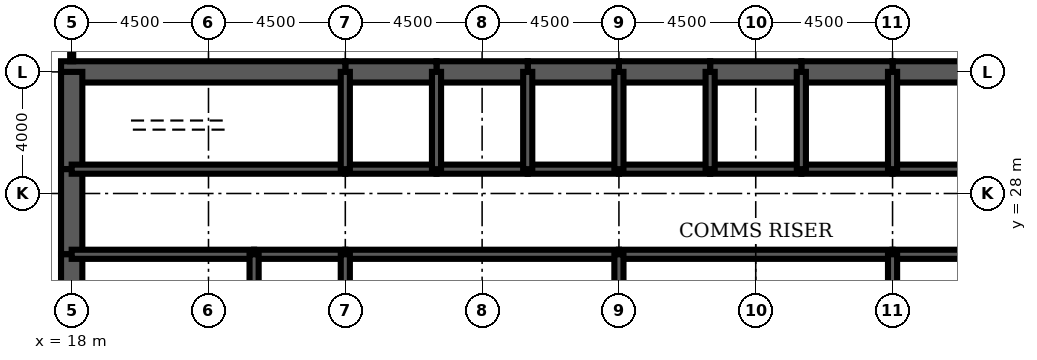
"""IFC4 building model, lengths in metres.
Left out: names, types, materials, properties, quantities, classifications, styles, units other than length and angle.
Written with IfcOpenShell. Run it as: python <this file> out.ifc"""

import sys

from ifc_helpers import new_model, si_unit, direction, frame, frame_2d, origin, place, context, subcontext, project, spatial, rectangle, extrude, element, fill, save


model = new_model("IFC4")
c1 = context("Model", 3, precision=1e-05, world=origin(), true_north=direction((0.0, 1.0)))
c2 = subcontext(c1, "Body", "Model", "MODEL_VIEW")
j1 = project(units=[si_unit("LENGTHUNIT", "METRE"), si_unit("PLANEANGLEUNIT", "RADIAN")], contexts=[c1])
p1 = place(None, origin())
s1 = spatial("IfcSite", under=j1, at=p1, CompositionType="ELEMENT")
p2 = place(p1, origin())
s2 = spatial("IfcBuilding", under=s1, at=p2, CompositionType="ELEMENT")
p3 = place(p2, frame((0.0, 0.0, 287.9)))
s3 = spatial("IfcBuildingStorey", under=s2, at=p3, CompositionType="ELEMENT", Elevation=287.9)
p4 = place(p3, frame((54.35, 32.0, 0.0), z_axis=(0.0, 0.0, 1.0), x_axis=(-1.0, 0.0, 0.0)))
e1 = element("IfcWall", 1, at=p4, inside=s3, PredefinedType="SHEAR", context=c2, shape_type="SweptSolid", body=[
    extrude(rectangle(XDim=9.35, YDim=0.7, at=frame_2d((4.675, 0.0))), origin(), (0.0, 0.0, 1.0), 4.2),
])
for number, where, z_axis, x_axis in (
    (2, (45.0, 32.0, 0.0), (0.0, 0.0, 1.0), (-1.0, 0.0, 0.0)),
    (3, (42.0, 32.0, 0.0), (0.0, 0.0, 1.0), (-1.0, 0.0, 0.0)),
    (4, (39.0, 32.0, 0.0), (0.0, 0.0, 1.0), (-1.0, 0.0, 0.0)),
    (5, (36.0, 32.0, 0.0), (0.0, 0.0, 1.0), (-1.0, 0.0, 0.0)),
    (6, (33.0, 32.0, 0.0), (0.0, 0.0, 1.0), (-1.0, 0.0, 0.0)),
    (7, (30.0, 32.0, 0.0), (0.0, 0.0, 1.0), (-1.0, 0.0, 0.0)),
):
    element("IfcWall", number, at=place(p3, frame(where, z_axis=z_axis, x_axis=x_axis)), inside=s3, PredefinedType="SHEAR", context=c2, shape_type="SweptSolid", body=[
        extrude(rectangle(XDim=3.0, YDim=0.7, at=frame_2d((1.5, 0.0))), origin(), (0.0, 0.0, 1.0), 4.2),
    ])
p5 = place(p3, frame((27.0, 32.0, 0.0), z_axis=(0.0, 0.0, 1.0), x_axis=(-1.0, 0.0, 0.0)))
e8 = element("IfcWall", 8, at=p5, inside=s3, PredefinedType="SHEAR", context=c2, shape_type="SweptSolid", body=[
    extrude(rectangle(XDim=9.35, YDim=0.7, at=frame_2d((4.675, 0.0))), origin(), (0.0, 0.0, 1.0), 4.2),
])
p6 = place(p3, frame((18.0, 32.0, 0.0), z_axis=(0.0, 0.0, 1.0), x_axis=(0.0, -1.0, 0.0)))
e9 = element("IfcWall", 9, at=p6, inside=s3, PredefinedType="SHEAR", context=c2, shape_type="SweptSolid", body=[
    extrude(rectangle(XDim=3.2, YDim=0.7, at=frame_2d((1.6, 0.0))), origin(), (0.0, 0.0, 1.0), 4.2),
])
p7 = place(p3, frame((18.0, 28.8, 0.0), z_axis=(0.0, 0.0, 1.0), x_axis=(0.0, -1.0, 0.0)))
e10 = element("IfcWall", 10, at=p7, inside=s3, PredefinedType="SHEAR", context=c2, shape_type="SweptSolid", body=[
    extrude(rectangle(XDim=2.8, YDim=0.7, at=frame_2d((1.4, 0.0))), origin(), (0.0, 0.0, 1.0), 4.2),
])
p8 = place(p7, frame((0.4, 0.0, 0.0)))
e11 = element("IfcOpeningElement", 11, at=p8, cuts=e10, PredefinedType="OPENING", context=c2, shape_type="SweptSolid", body=[
    extrude(rectangle(XDim=1.8, YDim=2.1, at=frame_2d((0.9, 1.05))), frame((0.0, 0.36, 0.0), z_axis=(0.0, -1.0, 0.0), x_axis=(1.0, 0.0, 0.0)), (0.0, 0.0, 1.0), 0.72),
])
p9 = place(p3, frame((18.0, 26.0, 0.0), z_axis=(0.0, 0.0, 1.0), x_axis=(0.0, -1.0, 0.0)))
e12 = element("IfcWall", 12, at=p9, inside=s3, PredefinedType="SHEAR", context=c2, shape_type="SweptSolid", body=[
    extrude(rectangle(XDim=4.0, YDim=0.7, at=frame_2d((2.0, 0.0))), origin(), (0.0, 0.0, 1.0), 4.2),
])
p10 = place(p3, frame((18.0, 28.8, 0.0), z_axis=(0.0, 0.0, 1.0), x_axis=(1.0, 0.0, 0.0)))
e13 = element("IfcWall", 13, at=p10, inside=s3, PredefinedType="SOLIDWALL", context=c2, shape_type="SweptSolid", body=[
    extrude(rectangle(XDim=9.0, YDim=0.3, at=frame_2d((4.5, 0.0))), origin(), (0.0, 0.0, 1.0), 4.2),
])
p11 = place(p10, frame((0.65, 0.0, 0.0)))
e14 = element("IfcOpeningElement", 14, at=p11, cuts=e13, PredefinedType="OPENING", context=c2, shape_type="SweptSolid", body=[
    extrude(rectangle(XDim=1.0, YDim=2.1, at=frame_2d((0.5, 1.05))), frame((0.0, 0.16, 0.0), z_axis=(0.0, -1.0, 0.0), x_axis=(1.0, 0.0, 0.0)), (0.0, 0.0, 1.0), 0.32),
])
p12 = place(p3, frame((27.0, 28.8, 0.0), z_axis=(0.0, 0.0, 1.0), x_axis=(1.0, 0.0, 0.0)))
e15 = element("IfcWall", 15, at=p12, inside=s3, PredefinedType="SOLIDWALL", context=c2, shape_type="SweptSolid", body=[
    extrude(rectangle(XDim=3.0, YDim=0.3, at=frame_2d((1.5, 0.0))), origin(), (0.0, 0.0, 1.0), 4.2),
])
p13 = place(p12, frame((0.95, 0.0, 0.0)))
e16 = element("IfcOpeningElement", 16, at=p13, cuts=e15, PredefinedType="OPENING", context=c2, shape_type="SweptSolid", body=[
    extrude(rectangle(XDim=1.1, YDim=2.2, at=frame_2d((0.55, 1.1))), frame((0.0, 0.16, 0.0), z_axis=(0.0, -1.0, 0.0), x_axis=(1.0, 0.0, 0.0)), (0.0, 0.0, 1.0), 0.32),
])
p14 = place(p3, frame((30.0, 28.8, 0.0), z_axis=(0.0, 0.0, 1.0), x_axis=(1.0, 0.0, 0.0)))
e17 = element("IfcWall", 17, at=p14, inside=s3, PredefinedType="SOLIDWALL", context=c2, shape_type="SweptSolid", body=[
    extrude(rectangle(XDim=3.0, YDim=0.3, at=frame_2d((1.5, 0.0))), origin(), (0.0, 0.0, 1.0), 4.2),
])
p15 = place(p14, frame((0.95, 0.0, 0.0)))
e18 = element("IfcOpeningElement", 18, at=p15, cuts=e17, PredefinedType="OPENING", context=c2, shape_type="SweptSolid", body=[
    extrude(rectangle(XDim=1.1, YDim=2.2, at=frame_2d((0.55, 1.1))), frame((0.0, 0.16, 0.0), z_axis=(0.0, -1.0, 0.0), x_axis=(1.0, 0.0, 0.0)), (0.0, 0.0, 1.0), 0.32),
])
p16 = place(p3, frame((33.0, 28.8, 0.0), z_axis=(0.0, 0.0, 1.0), x_axis=(1.0, 0.0, 0.0)))
e19 = element("IfcWall", 19, at=p16, inside=s3, PredefinedType="SOLIDWALL", context=c2, shape_type="SweptSolid", body=[
    extrude(rectangle(XDim=3.0, YDim=0.3, at=frame_2d((1.5, 0.0))), origin(), (0.0, 0.0, 1.0), 4.2),
])
p17 = place(p16, frame((0.95, 0.0, 0.0)))
e20 = element("IfcOpeningElement", 20, at=p17, cuts=e19, PredefinedType="OPENING", context=c2, shape_type="SweptSolid", body=[
    extrude(rectangle(XDim=1.1, YDim=2.2, at=frame_2d((0.55, 1.1))), frame((0.0, 0.16, 0.0), z_axis=(0.0, -1.0, 0.0), x_axis=(1.0, 0.0, 0.0)), (0.0, 0.0, 1.0), 0.32),
])
p18 = place(p3, frame((36.0, 28.8, 0.0), z_axis=(0.0, 0.0, 1.0), x_axis=(1.0, 0.0, 0.0)))
e21 = element("IfcWall", 21, at=p18, inside=s3, PredefinedType="SOLIDWALL", context=c2, shape_type="SweptSolid", body=[
    extrude(rectangle(XDim=3.0, YDim=0.3, at=frame_2d((1.5, 0.0))), origin(), (0.0, 0.0, 1.0), 4.2),
])
p19 = place(p18, frame((1.0, 0.0, 0.0)))
e22 = element("IfcOpeningElement", 22, at=p19, cuts=e21, PredefinedType="OPENING", context=c2, shape_type="SweptSolid", body=[
    extrude(rectangle(XDim=1.0, YDim=2.1, at=frame_2d((0.5, 1.05))), frame((0.0, 0.16, 0.0), z_axis=(0.0, -1.0, 0.0), x_axis=(1.0, 0.0, 0.0)), (0.0, 0.0, 1.0), 0.32),
])
p20 = place(p3, frame((39.0, 28.8, 0.0), z_axis=(0.0, 0.0, 1.0), x_axis=(1.0, 0.0, 0.0)))
e23 = element("IfcWall", 23, at=p20, inside=s3, PredefinedType="SOLIDWALL", context=c2, shape_type="SweptSolid", body=[
    extrude(rectangle(XDim=3.0, YDim=0.3, at=frame_2d((1.5, 0.0))), origin(), (0.0, 0.0, 1.0), 4.2),
])
p21 = place(p20, frame((1.0, 0.0, 0.0)))
e24 = element("IfcOpeningElement", 24, at=p21, cuts=e23, PredefinedType="OPENING", context=c2, shape_type="SweptSolid", body=[
    extrude(rectangle(XDim=1.0, YDim=2.1, at=frame_2d((0.5, 1.05))), frame((0.0, 0.16, 0.0), z_axis=(0.0, -1.0, 0.0), x_axis=(1.0, 0.0, 0.0)), (0.0, 0.0, 1.0), 0.32),
])
p22 = place(p3, frame((42.0, 28.8, 0.0), z_axis=(0.0, 0.0, 1.0), x_axis=(1.0, 0.0, 0.0)))
e25 = element("IfcWall", 25, at=p22, inside=s3, PredefinedType="SOLIDWALL", context=c2, shape_type="SweptSolid", body=[
    extrude(rectangle(XDim=3.0, YDim=0.3, at=frame_2d((1.5, 0.0))), origin(), (0.0, 0.0, 1.0), 4.2),
])
p23 = place(p22, frame((0.95, 0.0, 0.0)))
e26 = element("IfcOpeningElement", 26, at=p23, cuts=e25, PredefinedType="OPENING", context=c2, shape_type="SweptSolid", body=[
    extrude(rectangle(XDim=1.1, YDim=2.2, at=frame_2d((0.55, 1.1))), frame((0.0, 0.16, 0.0), z_axis=(0.0, -1.0, 0.0), x_axis=(1.0, 0.0, 0.0)), (0.0, 0.0, 1.0), 0.32),
])
p24 = place(p3, frame((45.0, 28.8, 0.0), z_axis=(0.0, 0.0, 1.0), x_axis=(1.0, 0.0, 0.0)))
e27 = element("IfcWall", 27, at=p24, inside=s3, PredefinedType="SOLIDWALL", context=c2, shape_type="SweptSolid", body=[
    extrude(rectangle(XDim=9.0, YDim=0.3, at=frame_2d((4.5, 0.0))), origin(), (0.0, 0.0, 1.0), 4.2),
])
p25 = place(p24, frame((7.35, 0.0, 0.0)))
e28 = element("IfcOpeningElement", 28, at=p25, cuts=e27, PredefinedType="OPENING", context=c2, shape_type="SweptSolid", body=[
    extrude(rectangle(XDim=1.0, YDim=2.1, at=frame_2d((0.5, 1.05))), frame((0.0, 0.16, 0.0), z_axis=(0.0, -1.0, 0.0), x_axis=(1.0, 0.0, 0.0)), (0.0, 0.0, 1.0), 0.32),
])
p26 = place(p3, frame((18.0, 26.0, 0.0), z_axis=(0.0, 0.0, 1.0), x_axis=(1.0, 0.0, 0.0)))
e29 = element("IfcWall", 29, at=p26, inside=s3, PredefinedType="SOLIDWALL", context=c2, shape_type="SweptSolid", body=[
    extrude(rectangle(XDim=6.0, YDim=0.3, at=frame_2d((3.0, 0.0))), origin(), (0.0, 0.0, 1.0), 4.2),
])
p27 = place(p3, frame((24.0, 26.0, 0.0), z_axis=(0.0, 0.0, 1.0), x_axis=(1.0, 0.0, 0.0)))
e30 = element("IfcWall", 30, at=p27, inside=s3, PredefinedType="SOLIDWALL", context=c2, shape_type="SweptSolid", body=[
    extrude(rectangle(XDim=3.0, YDim=0.3, at=frame_2d((1.5, 0.0))), origin(), (0.0, 0.0, 1.0), 4.2),
])
for number, where, z_axis, x_axis in (
    (31, (27.0, 26.0, 0.0), (0.0, 0.0, 1.0), (1.0, 0.0, 0.0)),
    (32, (36.0, 26.0, 0.0), (0.0, 0.0, 1.0), (1.0, 0.0, 0.0)),
):
    element("IfcWall", number, at=place(p3, frame(where, z_axis=z_axis, x_axis=x_axis)), inside=s3, PredefinedType="SOLIDWALL", context=c2, shape_type="SweptSolid", body=[
        extrude(rectangle(XDim=9.0, YDim=0.3, at=frame_2d((4.5, 0.0))), origin(), (0.0, 0.0, 1.0), 4.2),
    ])
p28 = place(p3, frame((45.0, 26.0, 0.0), z_axis=(0.0, 0.0, 1.0), x_axis=(1.0, 0.0, 0.0)))
e33 = element("IfcWall", 33, at=p28, inside=s3, PredefinedType="SOLIDWALL", context=c2, shape_type="SweptSolid", body=[
    extrude(rectangle(XDim=3.0, YDim=0.3, at=frame_2d((1.5, 0.0))), origin(), (0.0, 0.0, 1.0), 4.2),
])
for number, where, z_axis, x_axis in (
    (34, (27.0, 28.8, 0.0), (0.0, 0.0, 1.0), (0.0, 1.0, 0.0)),
    (35, (30.0, 28.8, 0.0), (0.0, 0.0, 1.0), (0.0, 1.0, 0.0)),
    (36, (33.0, 28.8, 0.0), (0.0, 0.0, 1.0), (0.0, 1.0, 0.0)),
    (37, (36.0, 28.8, 0.0), (0.0, 0.0, 1.0), (0.0, 1.0, 0.0)),
    (38, (39.0, 28.8, 0.0), (0.0, 0.0, 1.0), (0.0, 1.0, 0.0)),
    (39, (42.0, 28.8, 0.0), (0.0, 0.0, 1.0), (0.0, 1.0, 0.0)),
    (40, (45.0, 28.8, 0.0), (0.0, 0.0, 1.0), (0.0, 1.0, 0.0)),
):
    element("IfcWall", number, at=place(p3, frame(where, z_axis=z_axis, x_axis=x_axis)), inside=s3, PredefinedType="SOLIDWALL", context=c2, shape_type="SweptSolid", body=[
        extrude(rectangle(XDim=3.2, YDim=0.3, at=frame_2d((1.6, 0.0))), origin(), (0.0, 0.0, 1.0), 4.2),
    ])
for number, where, z_axis, x_axis in (
    (41, (24.0, 22.0, 0.0), (0.0, 0.0, 1.0), (0.0, 1.0, 0.0)),
    (42, (27.0, 22.0, 0.0), (0.0, 0.0, 1.0), (0.0, 1.0, 0.0)),
    (43, (36.0, 22.0, 0.0), (0.0, 0.0, 1.0), (0.0, 1.0, 0.0)),
    (44, (45.0, 22.0, 0.0), (0.0, 0.0, 1.0), (0.0, 1.0, 0.0)),
):
    element("IfcWall", number, at=place(p3, frame(where, z_axis=z_axis, x_axis=x_axis)), inside=s3, PredefinedType="SOLIDWALL", context=c2, shape_type="SweptSolid", body=[
        extrude(rectangle(XDim=4.0, YDim=0.3, at=frame_2d((2.0, 0.0))), origin(), (0.0, 0.0, 1.0), 4.2),
    ])
p29 = place(p3, frame((20.225, 22.15, 0.0), z_axis=(0.0, 0.0, 1.0), x_axis=(0.0, 1.0, 0.0)))
e45 = element("IfcWall", 45, at=p29, inside=s3, PredefinedType="PARTITIONING", context=c2, shape_type="SweptSolid", body=[
    extrude(rectangle(XDim=3.7, YDim=0.15, at=frame_2d((1.85, 0.0))), origin(), (0.0, 0.0, 1.0), 3.0),
])
p30 = place(p3, frame((46.2, 26.15, 0.0), z_axis=(0.0, 0.0, 1.0), x_axis=(0.0, 1.0, 0.0)))
e46 = element("IfcWall", 46, at=p30, inside=s3, PredefinedType="PARTITIONING", context=c2, shape_type="SweptSolid", body=[
    extrude(rectangle(XDim=2.5, YDim=0.15, at=frame_2d((1.25, 0.0))), origin(), (0.0, 0.0, 1.0), 3.0),
])
p31 = place(p30, frame((1.15, 0.0, 0.0)))
e47 = element("IfcOpeningElement", 47, at=p31, cuts=e46, PredefinedType="OPENING", context=c2, shape_type="SweptSolid", body=[
    extrude(rectangle(XDim=1.0, YDim=2.1, at=frame_2d((0.5, 1.05))), frame((0.0, 0.085, 0.0), z_axis=(0.0, -1.0, 0.0), x_axis=(1.0, 0.0, 0.0)), (0.0, 0.0, 1.0), 0.17),
])
p32 = place(p3, frame((18.0, 32.35, 0.0), z_axis=(0.0, 0.0, 1.0), x_axis=(0.0, 1.0, 0.0)))
e48 = element("IfcWall", 48, at=p32, inside=s3, PredefinedType="PARTITIONING", context=c2, shape_type="SweptSolid", body=[
    extrude(rectangle(XDim=11.2, YDim=0.1, at=frame_2d((5.6, 0.0))), origin(), (0.0, 0.0, 1.0), 3.0),
])
p33 = place(p32, frame((4.8, 0.0, 0.0)))
e49 = element("IfcOpeningElement", 49, at=p33, cuts=e48, PredefinedType="OPENING", context=c2, shape_type="SweptSolid", body=[
    extrude(rectangle(XDim=1.6, YDim=2.1, at=frame_2d((0.8, 1.05))), frame((0.0, 0.06, 0.0), z_axis=(0.0, -1.0, 0.0), x_axis=(1.0, 0.0, 0.0)), (0.0, 0.0, 1.0), 0.12),
])
p34 = place(p31, origin())
e50 = element("IfcDoor", 50, at=p34, inside=s3, OperationType="SINGLE_SWING_RIGHT", PredefinedType="DOOR", context=c2, shape_type="SweptSolid", body=[
    extrude(rectangle(XDim=1.0, YDim=2.1, at=frame_2d((0.5, 1.05))), frame((0.0, 0.025, 0.0), z_axis=(0.0, -1.0, 0.0), x_axis=(1.0, 0.0, 0.0)), (0.0, 0.0, 1.0), 0.05),
])
fill(e47, e50)
p35 = place(p23, origin())
e51 = element("IfcDoor", 51, at=p35, inside=s3, OperationType="DOUBLE_DOOR_SLIDING", PredefinedType="USERDEFINED", context=c2, shape_type="SweptSolid", body=[
    extrude(rectangle(XDim=1.1, YDim=2.2, at=frame_2d((0.55, 1.1))), frame((0.0, 0.025, 0.0), z_axis=(0.0, -1.0, 0.0), x_axis=(1.0, 0.0, 0.0)), (0.0, 0.0, 1.0), 0.05),
])
fill(e26, e51)
p36 = place(p13, origin())
e52 = element("IfcDoor", 52, at=p36, inside=s3, OperationType="DOUBLE_DOOR_SLIDING", PredefinedType="USERDEFINED", context=c2, shape_type="SweptSolid", body=[
    extrude(rectangle(XDim=1.1, YDim=2.2, at=frame_2d((0.55, 1.1))), frame((0.0, 0.025, 0.0), z_axis=(0.0, -1.0, 0.0), x_axis=(1.0, 0.0, 0.0)), (0.0, 0.0, 1.0), 0.05),
])
fill(e16, e52)
p37 = place(p15, origin())
e53 = element("IfcDoor", 53, at=p37, inside=s3, OperationType="DOUBLE_DOOR_SLIDING", PredefinedType="USERDEFINED", context=c2, shape_type="SweptSolid", body=[
    extrude(rectangle(XDim=1.1, YDim=2.2, at=frame_2d((0.55, 1.1))), frame((0.0, 0.025, 0.0), z_axis=(0.0, -1.0, 0.0), x_axis=(1.0, 0.0, 0.0)), (0.0, 0.0, 1.0), 0.05),
])
fill(e18, e53)
p38 = place(p17, origin())
e54 = element("IfcDoor", 54, at=p38, inside=s3, OperationType="DOUBLE_DOOR_SLIDING", PredefinedType="USERDEFINED", context=c2, shape_type="SweptSolid", body=[
    extrude(rectangle(XDim=1.1, YDim=2.2, at=frame_2d((0.55, 1.1))), frame((0.0, 0.025, 0.0), z_axis=(0.0, -1.0, 0.0), x_axis=(1.0, 0.0, 0.0)), (0.0, 0.0, 1.0), 0.05),
])
fill(e20, e54)
p39 = place(p11, origin())
e55 = element("IfcDoor", 55, at=p39, inside=s3, OperationType="SINGLE_SWING_LEFT", PredefinedType="DOOR", context=c2, shape_type="SweptSolid", body=[
    extrude(rectangle(XDim=1.0, YDim=2.1, at=frame_2d((0.5, 1.05))), frame((0.0, 0.025, 0.0), z_axis=(0.0, -1.0, 0.0), x_axis=(1.0, 0.0, 0.0)), (0.0, 0.0, 1.0), 0.05),
])
fill(e14, e55)
p40 = place(p8, origin())
e56 = element("IfcDoor", 56, at=p40, inside=s3, OperationType="SINGLE_SWING_LEFT", PredefinedType="DOOR", context=c2, shape_type="SweptSolid", body=[
    extrude(rectangle(XDim=1.8, YDim=2.1, at=frame_2d((0.9, 1.05))), frame((0.0, 0.35, 0.0), z_axis=(0.0, -1.0, 0.0), x_axis=(1.0, 0.0, 0.0)), (0.0, 0.0, 1.0), 0.699),
])
fill(e11, e56)
p41 = place(p19, origin())
e57 = element("IfcDoor", 57, at=p41, inside=s3, OperationType="SINGLE_SWING_LEFT", PredefinedType="DOOR", context=c2, shape_type="SweptSolid", body=[
    extrude(rectangle(XDim=1.0, YDim=2.1, at=frame_2d((0.5, 1.05))), frame((0.0, 0.025, 0.0), z_axis=(0.0, -1.0, 0.0), x_axis=(1.0, 0.0, 0.0)), (0.0, 0.0, 1.0), 0.05),
])
fill(e22, e57)
p42 = place(p21, origin())
e58 = element("IfcDoor", 58, at=p42, inside=s3, OperationType="SINGLE_SWING_LEFT", PredefinedType="DOOR", context=c2, shape_type="SweptSolid", body=[
    extrude(rectangle(XDim=1.0, YDim=2.1, at=frame_2d((0.5, 1.05))), frame((0.0, 0.025, 0.0), z_axis=(0.0, -1.0, 0.0), x_axis=(1.0, 0.0, 0.0)), (0.0, 0.0, 1.0), 0.05),
])
fill(e24, e58)
save(model, sys.argv[1])
